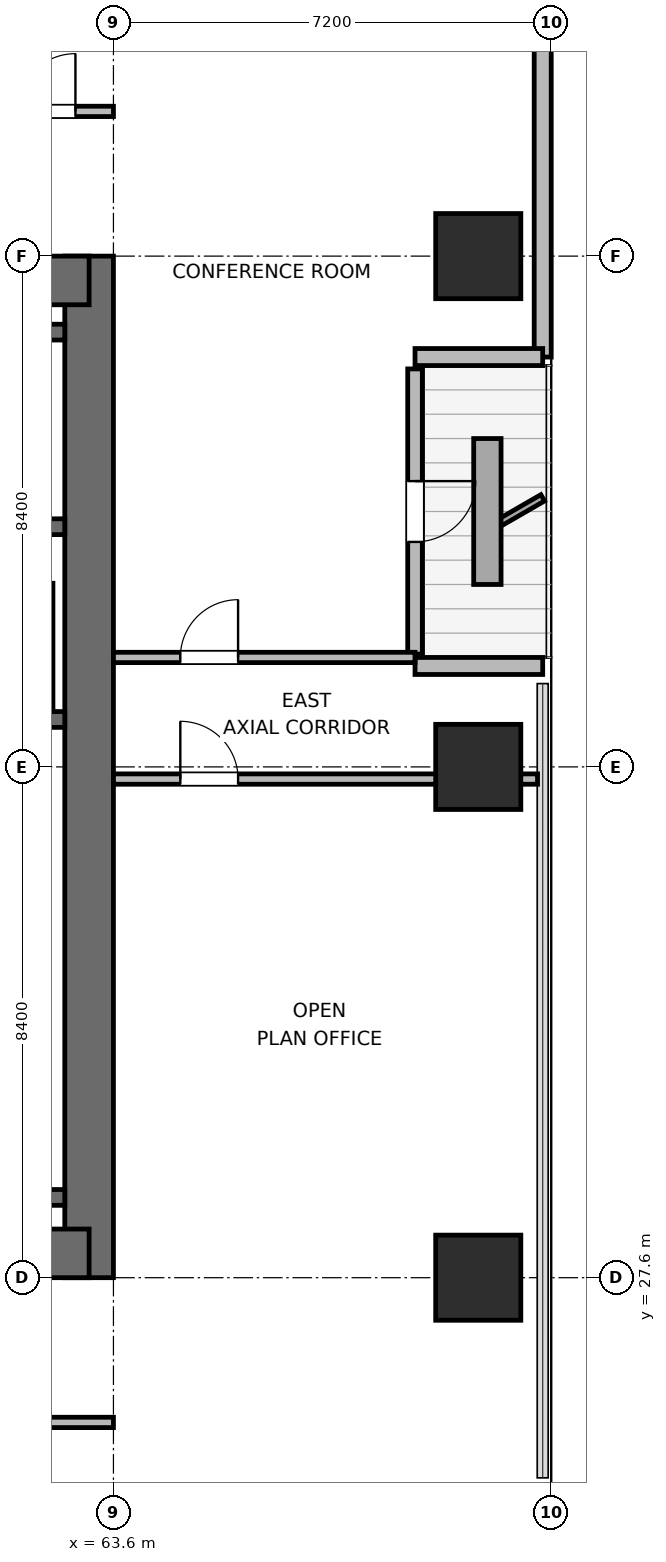
"""IFC4 building model, lengths in metres.
Left out: names, types, materials, properties, quantities, classifications, styles, units other than length and angle.
Written with IfcOpenShell. Run it as: python <this file> out.ifc"""

import sys

from ifc_helpers import new_model, si_unit, direction, frame, frame_2d, origin, origin_2d, place, context, subcontext, project, spatial, rectangle, extrude, element, fill, save


model = new_model("IFC4")
c1 = context("Model", 3, precision=1e-05, world=origin(), true_north=direction((0.0, 1.0)))
c2 = subcontext(c1, "Body", "Model", "MODEL_VIEW")
j1 = project(units=[si_unit("LENGTHUNIT", "METRE"), si_unit("PLANEANGLEUNIT", "RADIAN")], contexts=[c1])
p1 = place(None, origin())
s1 = spatial("IfcSite", under=j1, at=p1, CompositionType="ELEMENT")
p2 = place(p1, origin())
s2 = spatial("IfcBuilding", under=s1, at=p2, CompositionType="ELEMENT")
p3 = place(p2, frame((0.0, 0.0, 150.6)))
s3 = spatial("IfcBuildingStorey", under=s2, at=p3, CompositionType="ELEMENT", Elevation=150.6)
p4 = place(p3, frame((63.2, 27.6, 0.0), z_axis=(0.0, 0.0, 1.0), x_axis=(0.0, 1.0, 0.0)))
e1 = element("IfcWall", 1, at=p4, inside=s3, PredefinedType="SHEAR", context=c2, shape_type="SweptSolid", body=[
    extrude(rectangle(XDim=16.8, YDim=0.8, at=frame_2d((8.4, 0.0))), origin(), (0.0, 0.0, 1.0), 3.9),
])
p5 = place(p3, frame((54.0, 28.0, 0.0), z_axis=(0.0, 0.0, 1.0), x_axis=(1.0, 0.0, 0.0)))
e2 = element("IfcWall", 2, at=p5, inside=s3, PredefinedType="SHEAR", context=c2, shape_type="SweptSolid", body=[
    extrude(rectangle(XDim=9.2, YDim=0.8, at=frame_2d((4.6, 0.0))), origin(), (0.0, 0.0, 1.0), 3.9),
])
p6 = place(p5, frame((3.975, 0.0, 0.0)))
e3 = element("IfcOpeningElement", 3, at=p6, cuts=e2, PredefinedType="OPENING", context=c2, shape_type="SweptSolid", body=[
    extrude(rectangle(XDim=1.05, YDim=2.04, at=frame_2d((0.525, 1.02))), frame((0.0, 0.41, 0.0), z_axis=(0.0, -1.0, 0.0), x_axis=(1.0, 0.0, 0.0)), (0.0, 0.0, 1.0), 0.82),
])
p7 = place(p3, frame((54.0, 44.0, 0.0), z_axis=(0.0, 0.0, 1.0), x_axis=(1.0, 0.0, 0.0)))
e4 = element("IfcWall", 4, at=p7, inside=s3, PredefinedType="SHEAR", context=c2, shape_type="SweptSolid", body=[
    extrude(rectangle(XDim=9.2, YDim=0.8, at=frame_2d((4.6, 0.0))), origin(), (0.0, 0.0, 1.0), 3.9),
])
for number, where, z_axis, x_axis in (
    (5, (58.89, 28.92, 0.0), (0.0, 0.0, 1.0), (1.0, 0.0, 0.0)),
    (6, (58.89, 36.78, 0.0), (0.0, 0.0, 1.0), (1.0, 0.0, 0.0)),
):
    element("IfcWall", number, at=place(p3, frame(where, z_axis=z_axis, x_axis=x_axis)), inside=s3, PredefinedType="SHEAR", context=c2, shape_type="SweptSolid", body=[
        extrude(rectangle(XDim=3.91, YDim=0.26, at=frame_2d((1.955, 0.0))), origin(), (0.0, 0.0, 1.0), 3.9),
    ])
p8 = place(p3, frame((54.4, 39.95, 0.0), z_axis=(0.0, 0.0, 1.0), x_axis=(1.0, 0.0, 0.0)))
e7 = element("IfcWall", 7, at=p8, inside=s3, PredefinedType="SHEAR", context=c2, shape_type="SweptSolid", body=[
    extrude(rectangle(XDim=8.4, YDim=0.26, at=frame_2d((4.2, 0.0))), origin(), (0.0, 0.0, 1.0), 3.9),
])
p9 = place(p8, frame((0.8, 0.0, 0.0)))
e8 = element("IfcOpeningElement", 8, at=p9, cuts=e7, PredefinedType="OPENING", context=c2, shape_type="SweptSolid", body=[
    extrude(rectangle(XDim=1.0, YDim=2.04, at=frame_2d((0.5, 1.02))), frame((0.0, 0.14, 0.0), z_axis=(0.0, -1.0, 0.0), x_axis=(1.0, 0.0, 0.0)), (0.0, 0.0, 1.0), 0.28),
])
p10 = place(p3, frame((54.4, 43.15, 0.0), z_axis=(0.0, 0.0, 1.0), x_axis=(1.0, 0.0, 0.0)))
e9 = element("IfcWall", 9, at=p10, inside=s3, PredefinedType="SHEAR", context=c2, shape_type="SweptSolid", body=[
    extrude(rectangle(XDim=8.4, YDim=0.26, at=frame_2d((4.2, 0.0))), origin(), (0.0, 0.0, 1.0), 3.9),
])
for number, where, z_axis, x_axis in (
    (10, (69.6, 27.6, 0.0), (0.0, 0.0, 1.0), (1.0, 0.0, 0.0)),
    (11, (69.6, 36.0, 0.0), (0.0, 0.0, 1.0), (1.0, 0.0, 0.0)),
    (12, (69.6, 44.4, 0.0), (0.0, 0.0, 1.0), (1.0, 0.0, 0.0)),
):
    element("IfcColumn", number, at=place(p3, frame(where, z_axis=z_axis, x_axis=x_axis)), inside=s3, PredefinedType="COLUMN", context=c2, shape_type="SweptSolid", body=[
        extrude(rectangle(XDim=1.4, YDim=1.4, at=origin_2d()), origin(), (0.0, 0.0, 1.0), 3.9),
    ])
p11 = place(p3, frame((70.66, 56.982, 0.0), z_axis=(0.0, 0.0, 1.0), x_axis=(0.0, -1.0, 0.0)))
e13 = element("IfcWall", 13, at=p11, inside=s3, PredefinedType="SOLIDWALL", context=c2, shape_type="SweptSolid", body=[
    extrude(rectangle(XDim=14.242, YDim=0.28, at=frame_2d((7.121, 0.0))), origin(), (0.0, 0.0, 1.0), 3.68),
])
p12 = place(p3, frame((70.66, 42.74, 0.0), z_axis=(0.0, 0.0, 1.0), x_axis=(-1.0, 0.0, 0.0)))
e14 = element("IfcWall", 14, at=p12, inside=s3, PredefinedType="SOLIDWALL", context=c2, shape_type="SweptSolid", body=[
    extrude(rectangle(XDim=2.1, YDim=0.28, at=frame_2d((1.05, 0.0))), origin(), (0.0, 0.0, 1.0), 3.116),
])
p13 = place(p3, frame((68.56, 42.545, 0.0), z_axis=(0.0, 0.0, 1.0), x_axis=(0.0, -1.0, 0.0)))
e15 = element("IfcWall", 15, at=p13, inside=s3, PredefinedType="SOLIDWALL", context=c2, shape_type="SweptSolid", body=[
    extrude(rectangle(XDim=4.69, YDim=0.24, at=frame_2d((2.345, 0.0))), origin(), (0.0, 0.0, 1.0), 3.248),
])
p14 = place(p13, frame((1.845, 0.0, 0.0)))
e16 = element("IfcOpeningElement", 16, at=p14, cuts=e15, PredefinedType="OPENING", context=c2, shape_type="SweptSolid", body=[
    extrude(rectangle(XDim=1.0, YDim=2.02, at=frame_2d((0.5, 1.01))), frame((0.0, 0.13, 0.0), z_axis=(0.0, -1.0, 0.0), x_axis=(1.0, 0.0, 0.0)), (0.0, 0.0, 1.0), 0.26),
])
p15 = place(p3, frame((68.56, 37.66, 0.0), z_axis=(0.0, 0.0, 1.0), x_axis=(1.0, 0.0, 0.0)))
e17 = element("IfcWall", 17, at=p15, inside=s3, PredefinedType="SOLIDWALL", context=c2, shape_type="SweptSolid", body=[
    extrude(rectangle(XDim=2.1, YDim=0.28, at=frame_2d((1.05, 0.0))), origin(), (0.0, 0.0, 1.0), 3.116),
])
p16 = place(p3, frame((62.5, 36.98, 0.0), z_axis=(0.0, 0.0, 1.0), x_axis=(0.0, 1.0, 0.0)))
e18 = element("IfcWall", 18, at=p16, inside=s3, PredefinedType="PARTITIONING", context=c2, shape_type="SweptSolid", body=[
    extrude(rectangle(XDim=2.04, YDim=0.21, at=frame_2d((1.02, 0.0))), origin(), (0.0, 0.0, 1.0), 3.68),
])
p17 = place(p3, frame((30.075, 25.22, 0.0), z_axis=(0.0, 0.0, 1.0), x_axis=(1.0, 0.0, 0.0)))
e19 = element("IfcWall", 19, at=p17, inside=s3, PredefinedType="PARTITIONING", context=c2, shape_type="SweptSolid", body=[
    extrude(rectangle(XDim=33.525, YDim=0.17, at=frame_2d((16.763, 0.0))), origin(), (0.0, 0.0, 1.0), 3.68),
])
p18 = place(p17, frame((3.238, 0.0, 0.0)))
e20 = element("IfcOpeningElement", 20, at=p18, cuts=e19, PredefinedType="OPENING", context=c2, shape_type="SweptSolid", body=[
    extrude(rectangle(XDim=0.95, YDim=2.04, at=frame_2d((0.475, 1.02))), frame((0.0, 0.095, 0.0), z_axis=(0.0, -1.0, 0.0), x_axis=(1.0, 0.0, 0.0)), (0.0, 0.0, 1.0), 0.19),
])
p19 = place(p17, frame((10.065, 0.0, 0.0)))
e21 = element("IfcOpeningElement", 21, at=p19, cuts=e19, PredefinedType="OPENING", context=c2, shape_type="SweptSolid", body=[
    extrude(rectangle(XDim=0.95, YDim=2.04, at=frame_2d((0.475, 1.02))), frame((0.0, 0.095, 0.0), z_axis=(0.0, -1.0, 0.0), x_axis=(1.0, 0.0, 0.0)), (0.0, 0.0, 1.0), 0.19),
])
p20 = place(p17, frame((16.29, 0.0, 0.0)))
e22 = element("IfcOpeningElement", 22, at=p20, cuts=e19, PredefinedType="OPENING", context=c2, shape_type="SweptSolid", body=[
    extrude(rectangle(XDim=0.95, YDim=2.04, at=frame_2d((0.475, 1.02))), frame((0.0, 0.095, 0.0), z_axis=(0.0, -1.0, 0.0), x_axis=(1.0, 0.0, 0.0)), (0.0, 0.0, 1.0), 0.19),
])
p21 = place(p17, frame((22.51, 0.0, 0.0)))
e23 = element("IfcOpeningElement", 23, at=p21, cuts=e19, PredefinedType="OPENING", context=c2, shape_type="SweptSolid", body=[
    extrude(rectangle(XDim=0.95, YDim=2.04, at=frame_2d((0.475, 1.02))), frame((0.0, 0.095, 0.0), z_axis=(0.0, -1.0, 0.0), x_axis=(1.0, 0.0, 0.0)), (0.0, 0.0, 1.0), 0.19),
])
p22 = place(p17, frame((29.335, 0.0, 0.0)))
e24 = element("IfcOpeningElement", 24, at=p22, cuts=e19, PredefinedType="OPENING", context=c2, shape_type="SweptSolid", body=[
    extrude(rectangle(XDim=0.95, YDim=2.04, at=frame_2d((0.475, 1.02))), frame((0.0, 0.095, 0.0), z_axis=(0.0, -1.0, 0.0), x_axis=(1.0, 0.0, 0.0)), (0.0, 0.0, 1.0), 0.19),
])
p23 = place(p3, frame((30.075, 46.78, 0.0), z_axis=(0.0, 0.0, 1.0), x_axis=(1.0, 0.0, 0.0)))
e25 = element("IfcWall", 25, at=p23, inside=s3, PredefinedType="PARTITIONING", context=c2, shape_type="SweptSolid", body=[
    extrude(rectangle(XDim=33.525, YDim=0.17, at=frame_2d((16.763, 0.0))), origin(), (0.0, 0.0, 1.0), 3.68),
])
p24 = place(p23, frame((4.543, 0.0, 0.0)))
e26 = element("IfcOpeningElement", 26, at=p24, cuts=e25, PredefinedType="OPENING", context=c2, shape_type="SweptSolid", body=[
    extrude(rectangle(XDim=0.95, YDim=2.04, at=frame_2d((0.475, 1.02))), frame((0.0, 0.095, 0.0), z_axis=(0.0, -1.0, 0.0), x_axis=(1.0, 0.0, 0.0)), (0.0, 0.0, 1.0), 0.19),
])
p25 = place(p23, frame((11.37, 0.0, 0.0)))
e27 = element("IfcOpeningElement", 27, at=p25, cuts=e25, PredefinedType="OPENING", context=c2, shape_type="SweptSolid", body=[
    extrude(rectangle(XDim=0.95, YDim=2.04, at=frame_2d((0.475, 1.02))), frame((0.0, 0.095, 0.0), z_axis=(0.0, -1.0, 0.0), x_axis=(1.0, 0.0, 0.0)), (0.0, 0.0, 1.0), 0.19),
])
p26 = place(p23, frame((18.905, 0.0, 0.0)))
e28 = element("IfcOpeningElement", 28, at=p26, cuts=e25, PredefinedType="OPENING", context=c2, shape_type="SweptSolid", body=[
    extrude(rectangle(XDim=0.95, YDim=2.04, at=frame_2d((0.475, 1.02))), frame((0.0, 0.095, 0.0), z_axis=(0.0, -1.0, 0.0), x_axis=(1.0, 0.0, 0.0)), (0.0, 0.0, 1.0), 0.19),
])
p27 = place(p23, frame((27.74, 0.0, 0.0)))
e29 = element("IfcOpeningElement", 29, at=p27, cuts=e25, PredefinedType="OPENING", context=c2, shape_type="SweptSolid", body=[
    extrude(rectangle(XDim=0.95, YDim=2.04, at=frame_2d((0.475, 1.02))), frame((0.0, 0.095, 0.0), z_axis=(0.0, -1.0, 0.0), x_axis=(1.0, 0.0, 0.0)), (0.0, 0.0, 1.0), 0.19),
])
p28 = place(p23, frame((31.95, 0.0, 0.0)))
e30 = element("IfcOpeningElement", 30, at=p28, cuts=e25, PredefinedType="OPENING", context=c2, shape_type="SweptSolid", body=[
    extrude(rectangle(XDim=0.95, YDim=2.04, at=frame_2d((0.475, 1.02))), frame((0.0, 0.095, 0.0), z_axis=(0.0, -1.0, 0.0), x_axis=(1.0, 0.0, 0.0)), (0.0, 0.0, 1.0), 0.19),
])
p29 = place(p3, frame((63.6, 35.8, 0.0), z_axis=(0.0, 0.0, 1.0), x_axis=(1.0, 0.0, 0.0)))
e31 = element("IfcWall", 31, at=p29, inside=s3, PredefinedType="PARTITIONING", context=c2, shape_type="SweptSolid", body=[
    extrude(rectangle(XDim=6.975, YDim=0.17, at=frame_2d((3.487, 0.0))), origin(), (0.0, 0.0, 1.0), 3.043),
])
p30 = place(p29, frame((1.1, 0.0, 0.0)))
e32 = element("IfcOpeningElement", 32, at=p30, cuts=e31, PredefinedType="OPENING", context=c2, shape_type="SweptSolid", body=[
    extrude(rectangle(XDim=0.95, YDim=2.04, at=frame_2d((0.475, 1.02))), frame((0.0, 0.095, 0.0), z_axis=(0.0, -1.0, 0.0), x_axis=(1.0, 0.0, 0.0)), (0.0, 0.0, 1.0), 0.19),
])
p31 = place(p3, frame((63.6, 37.8, 0.0), z_axis=(0.0, 0.0, 1.0), x_axis=(1.0, 0.0, 0.0)))
e33 = element("IfcWall", 33, at=p31, inside=s3, PredefinedType="PARTITIONING", context=c2, shape_type="SweptSolid", body=[
    extrude(rectangle(XDim=4.96, YDim=0.17, at=frame_2d((2.48, 0.0))), origin(), (0.0, 0.0, 1.0), 3.68),
])
p32 = place(p31, frame((1.1, 0.0, 0.0)))
e34 = element("IfcOpeningElement", 34, at=p32, cuts=e33, PredefinedType="OPENING", context=c2, shape_type="SweptSolid", body=[
    extrude(rectangle(XDim=0.95, YDim=2.04, at=frame_2d((0.475, 1.02))), frame((0.0, 0.095, 0.0), z_axis=(0.0, -1.0, 0.0), x_axis=(1.0, 0.0, 0.0)), (0.0, 0.0, 1.0), 0.19),
])
p33 = place(p14, origin())
e35 = element("IfcDoor", 35, at=p33, inside=s3, OperationType="SINGLE_SWING_LEFT", PredefinedType="DOOR", context=c2, shape_type="SweptSolid", body=[
    extrude(rectangle(XDim=1.0, YDim=2.02, at=frame_2d((0.5, 1.01))), frame((0.0, 0.025, 0.0), z_axis=(0.0, -1.0, 0.0), x_axis=(1.0, 0.0, 0.0)), (0.0, 0.0, 1.0), 0.05),
])
fill(e16, e35)
p34 = place(p28, origin())
e36 = element("IfcDoor", 36, at=p34, inside=s3, OperationType="SINGLE_SWING_RIGHT", PredefinedType="DOOR", context=c2, shape_type="SweptSolid", body=[
    extrude(rectangle(XDim=0.95, YDim=2.04, at=frame_2d((0.475, 1.02))), frame((0.0, 0.025, 0.0), z_axis=(0.0, -1.0, 0.0), x_axis=(1.0, 0.0, 0.0)), (0.0, 0.0, 1.0), 0.05),
])
fill(e30, e36)
p35 = place(p30, origin())
e37 = element("IfcDoor", 37, at=p35, inside=s3, OperationType="SINGLE_SWING_LEFT", PredefinedType="DOOR", context=c2, shape_type="SweptSolid", body=[
    extrude(rectangle(XDim=0.95, YDim=2.04, at=frame_2d((0.475, 1.02))), frame((0.0, 0.025, 0.0), z_axis=(0.0, -1.0, 0.0), x_axis=(1.0, 0.0, 0.0)), (0.0, 0.0, 1.0), 0.05),
])
fill(e32, e37)
p36 = place(p32, origin())
e38 = element("IfcDoor", 38, at=p36, inside=s3, OperationType="SINGLE_SWING_RIGHT", PredefinedType="DOOR", context=c2, shape_type="SweptSolid", body=[
    extrude(rectangle(XDim=0.95, YDim=2.04, at=frame_2d((0.475, 1.02))), frame((0.0, 0.025, 0.0), z_axis=(0.0, -1.0, 0.0), x_axis=(1.0, 0.0, 0.0)), (0.0, 0.0, 1.0), 0.05),
])
fill(e34, e38)
save(model, sys.argv[1])
